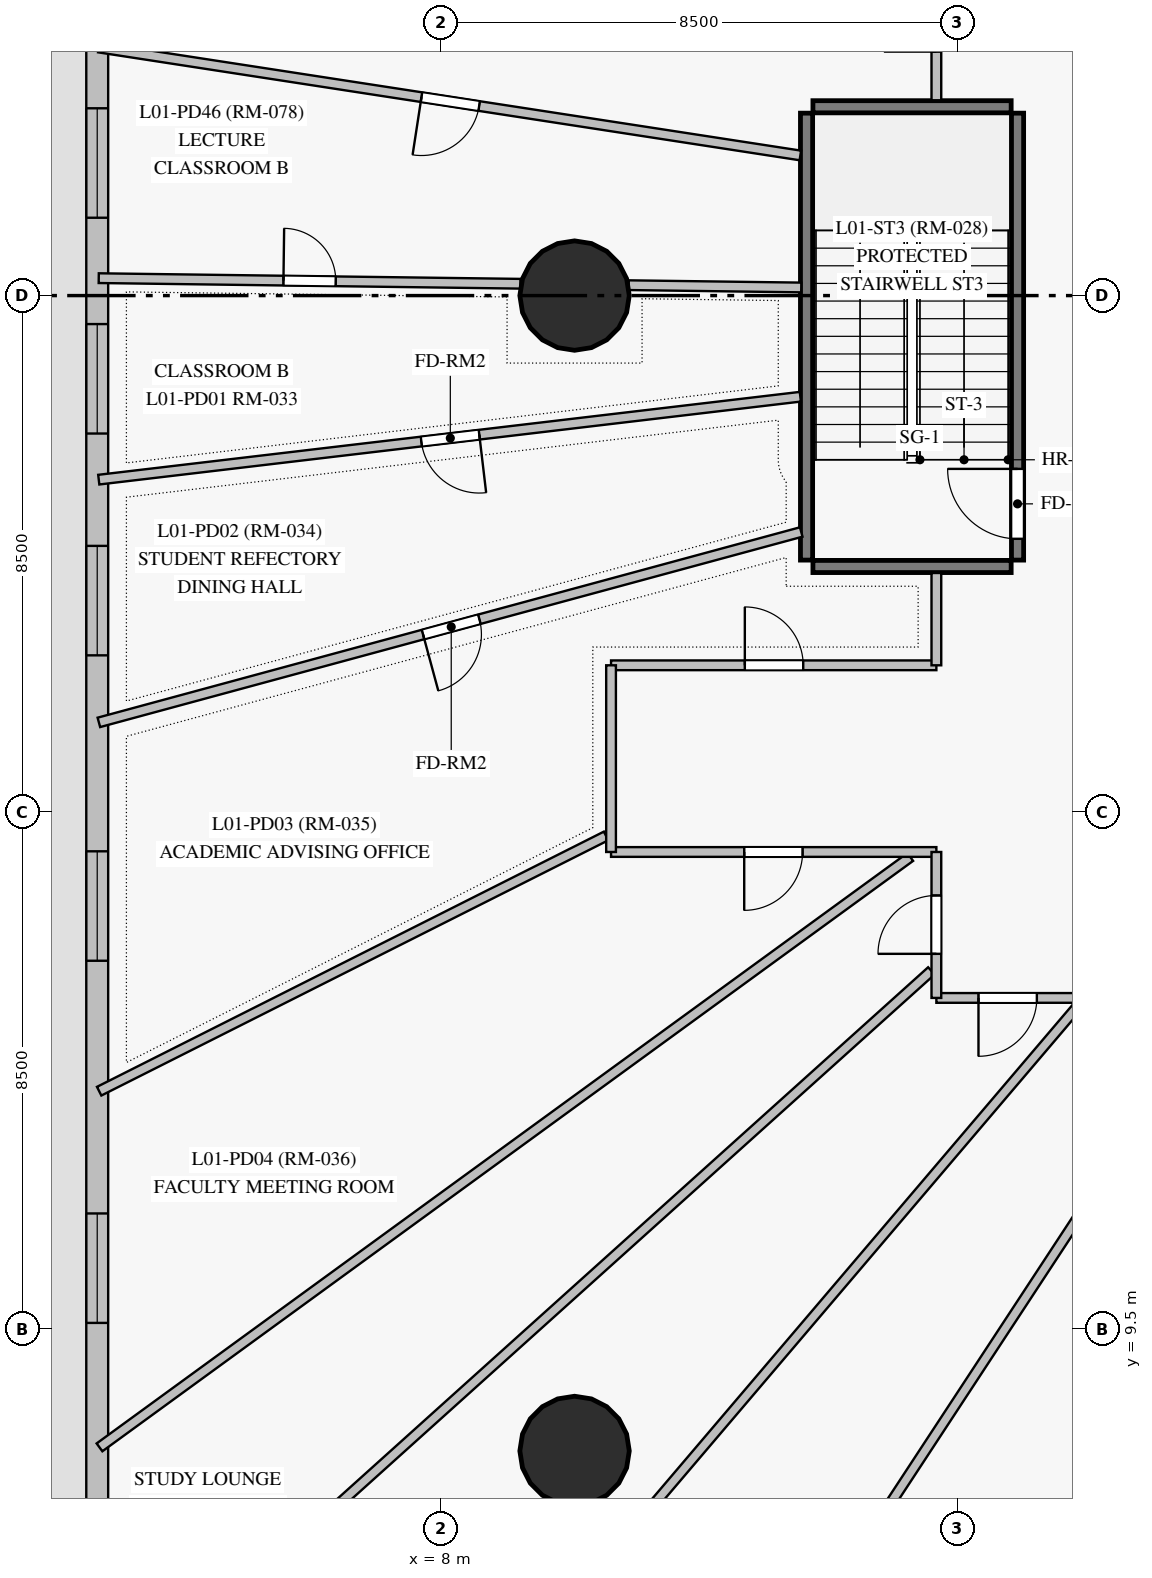
"""IFC4 building model, lengths in metres.
Left out: names, types, materials, properties, quantities, classifications, styles, units other than length and angle.
Written with IfcOpenShell. Run it as: python <this file> out.ifc"""

import sys

from ifc_helpers import new_model, si_unit, direction, frame, frame_2d, origin, origin_with_axes, origin_2d, place, context, subcontext, project, spatial, rectangle, circle, extrude, source, transform, mapped, element, fill, save


model = new_model("IFC4")
c1 = context("Model", 3, precision=1e-05, world=origin(), true_north=direction((0.0, 1.0)))
c2 = subcontext(c1, "Body", "Model", "MODEL_VIEW")
j1 = project(units=[si_unit("LENGTHUNIT", "METRE"), si_unit("PLANEANGLEUNIT", "RADIAN")], contexts=[c1])
p1 = place(None, origin())
s1 = spatial("IfcSite", under=j1, at=p1, CompositionType="ELEMENT")
p2 = place(p1, origin())
s2 = spatial("IfcBuilding", under=s1, at=p2, CompositionType="ELEMENT")
p3 = place(p2, frame((0.0, 0.0, 4.5)))
s3 = spatial("IfcBuildingStorey", under=s2, at=p3, CompositionType="ELEMENT", Elevation=4.5)
m1 = source(origin_with_axes(), c2, "Body", "SweptSolid", [
    extrude(circle(Radius=0.9, at=origin_2d()), origin(), (0.0, 0.0, 1.0), 4.5),
])
for number, where, z_axis, x_axis in (
    (1, (10.2, 7.5, 0.0), (0.0, 0.0, 1.0), (1.0, 0.0, 0.0)),
    (2, (10.2, 26.5, 0.0), (0.0, 0.0, 1.0), (1.0, 0.0, 0.0)),
):
    element("IfcColumn", number, at=place(p3, frame(where, z_axis=z_axis, x_axis=x_axis)), inside=s3, PredefinedType="COLUMN", context=c2, shape_type="MappedRepresentation", body=[
        mapped(m1, transform((0.0, 0.0, 0.0), scale=1.0)),
    ])
p4 = place(p3, frame((2.35, 49.4, 0.0), z_axis=(0.0, 0.0, 1.0), x_axis=(0.0, -1.0, 0.0)))
e3 = element("IfcWall", 3, at=p4, inside=s3, PredefinedType="SOLIDWALL", context=c2, shape_type="SweptSolid", body=[
    extrude(rectangle(XDim=45.8, YDim=0.36, at=frame_2d((22.9, 0.0))), origin(), (0.0, 0.0, 1.0), 4.2),
])
p5 = place(p4, frame((1.655, 0.0, 0.85)))
e4 = element("IfcOpeningElement", 4, at=p5, cuts=e3, PredefinedType="OPENING", context=c2, shape_type="SweptSolid", body=[
    extrude(rectangle(XDim=1.8, YDim=2.2, at=frame_2d((0.9, 1.1))), frame((0.0, 0.19, 0.0), z_axis=(0.0, -1.0, 0.0), x_axis=(1.0, 0.0, 0.0)), (0.0, 0.0, 1.0), 0.38),
])
p6 = place(p4, frame((5.489, 0.0, 0.85)))
e5 = element("IfcOpeningElement", 5, at=p6, cuts=e3, PredefinedType="OPENING", context=c2, shape_type="SweptSolid", body=[
    extrude(rectangle(XDim=1.8, YDim=2.2, at=frame_2d((0.9, 1.1))), frame((0.0, 0.19, 0.0), z_axis=(0.0, -1.0, 0.0), x_axis=(1.0, 0.0, 0.0)), (0.0, 0.0, 1.0), 0.38),
])
p7 = place(p4, frame((19.82, 0.0, 0.85)))
e6 = element("IfcOpeningElement", 6, at=p7, cuts=e3, PredefinedType="OPENING", context=c2, shape_type="SweptSolid", body=[
    extrude(rectangle(XDim=1.8, YDim=2.2, at=frame_2d((0.9, 1.1))), frame((0.0, 0.19, 0.0), z_axis=(0.0, -1.0, 0.0), x_axis=(1.0, 0.0, 0.0)), (0.0, 0.0, 1.0), 0.38),
])
p8 = place(p4, frame((23.368, 0.0, 0.85)))
e7 = element("IfcOpeningElement", 7, at=p8, cuts=e3, PredefinedType="OPENING", context=c2, shape_type="SweptSolid", body=[
    extrude(rectangle(XDim=1.8, YDim=2.2, at=frame_2d((0.9, 1.1))), frame((0.0, 0.19, 0.0), z_axis=(0.0, -1.0, 0.0), x_axis=(1.0, 0.0, 0.0)), (0.0, 0.0, 1.0), 0.38),
])
p9 = place(p4, frame((27.016, 0.0, 0.85)))
e8 = element("IfcOpeningElement", 8, at=p9, cuts=e3, PredefinedType="OPENING", context=c2, shape_type="SweptSolid", body=[
    extrude(rectangle(XDim=1.8, YDim=2.2, at=frame_2d((0.9, 1.1))), frame((0.0, 0.19, 0.0), z_axis=(0.0, -1.0, 0.0), x_axis=(1.0, 0.0, 0.0)), (0.0, 0.0, 1.0), 0.38),
])
p10 = place(p4, frame((32.039, 0.0, 0.85)))
e9 = element("IfcOpeningElement", 9, at=p10, cuts=e3, PredefinedType="OPENING", context=c2, shape_type="SweptSolid", body=[
    extrude(rectangle(XDim=1.8, YDim=2.2, at=frame_2d((0.9, 1.1))), frame((0.0, 0.19, 0.0), z_axis=(0.0, -1.0, 0.0), x_axis=(1.0, 0.0, 0.0)), (0.0, 0.0, 1.0), 0.38),
])
p11 = place(p4, frame((37.994, 0.0, 0.85)))
e10 = element("IfcOpeningElement", 10, at=p11, cuts=e3, PredefinedType="OPENING", context=c2, shape_type="SweptSolid", body=[
    extrude(rectangle(XDim=1.8, YDim=2.2, at=frame_2d((0.9, 1.1))), frame((0.0, 0.19, 0.0), z_axis=(0.0, -1.0, 0.0), x_axis=(1.0, 0.0, 0.0)), (0.0, 0.0, 1.0), 0.38),
])
p12 = place(p4, frame((42.795, 0.0, 0.85)))
e11 = element("IfcOpeningElement", 11, at=p12, cuts=e3, PredefinedType="OPENING", context=c2, shape_type="SweptSolid", body=[
    extrude(rectangle(XDim=1.8, YDim=2.2, at=frame_2d((0.9, 1.1))), frame((0.0, 0.19, 0.0), z_axis=(0.0, -1.0, 0.0), x_axis=(1.0, 0.0, 0.0)), (0.0, 0.0, 1.0), 0.38),
])
p13 = place(p4, frame((14.742, 0.0, 0.0)))
e12 = element("IfcOpeningElement", 12, at=p13, cuts=e3, PredefinedType="OPENING", context=c2, shape_type="SweptSolid", body=[
    extrude(rectangle(XDim=1.05, YDim=2.12, at=frame_2d((0.525, 1.06))), frame((0.0, 0.19, 0.0), z_axis=(0.0, -1.0, 0.0), x_axis=(1.0, 0.0, 0.0)), (0.0, 0.0, 1.0), 0.38),
])
p14 = place(p3, frame((14.015, 22.15, 0.0), z_axis=(0.0, 0.0, 1.0), x_axis=(0.0, 1.0, 0.0)))
e13 = element("IfcWall", 13, at=p14, inside=s3, PredefinedType="SHEAR", context=c2, shape_type="SweptSolid", body=[
    extrude(rectangle(XDim=7.35, YDim=0.2, at=frame_2d((3.675, 0.0))), origin(), (0.0, 0.0, 1.0), 4.2),
])
p15 = place(p3, frame((17.485, 22.15, 0.0), z_axis=(0.0, 0.0, 1.0), x_axis=(0.0, 1.0, 0.0)))
e14 = element("IfcWall", 14, at=p15, inside=s3, PredefinedType="SHEAR", context=c2, shape_type="SweptSolid", body=[
    extrude(rectangle(XDim=7.35, YDim=0.2, at=frame_2d((3.675, 0.0))), origin(), (0.0, 0.0, 1.0), 4.2),
])
p16 = place(p15, frame((0.35, 0.0, 0.0)))
e15 = element("IfcOpeningElement", 15, at=p16, cuts=e14, PredefinedType="OPENING", context=c2, shape_type="SweptSolid", body=[
    extrude(rectangle(XDim=1.15, YDim=2.15, at=frame_2d((0.575, 1.075))), frame((0.0, 0.11, 0.0), z_axis=(0.0, -1.0, 0.0), x_axis=(1.0, 0.0, 0.0)), (0.0, 0.0, 1.0), 0.22),
])
for number, where, z_axis, x_axis in (
    (16, (14.12, 22.045, 0.0), (0.0, 0.0, 1.0), (1.0, 0.0, 0.0)),
    (17, (14.12, 29.605, 0.0), (0.0, 0.0, 1.0), (1.0, 0.0, 0.0)),
):
    element("IfcWall", number, at=place(p3, frame(where, z_axis=z_axis, x_axis=x_axis)), inside=s3, PredefinedType="SHEAR", context=c2, shape_type="SweptSolid", body=[
        extrude(rectangle(XDim=3.26, YDim=0.2, at=frame_2d((1.63, 0.0))), origin(), (0.0, 0.0, 1.0), 4.2),
    ])
p17 = place(p3, frame((16.068, 15.395, 0.0), z_axis=(0.0, 0.0, 1.0), x_axis=(-0.743380945554, -0.668868275363, 0.0)))
e18 = element("IfcWall", 18, at=p17, inside=s3, PredefinedType="PARTITIONING", context=c2, shape_type="SweptSolid", body=[
    extrude(rectangle(XDim=18.04, YDim=0.16, at=frame_2d((9.02, 0.0))), origin(), (0.0, 0.0, 1.0), 4.2),
])
p18 = place(p3, frame((15.72, 17.268, 0.0), z_axis=(0.0, 0.0, 1.0), x_axis=(-0.808377474391, -0.588664470557, 0.0)))
e19 = element("IfcWall", 19, at=p18, inside=s3, PredefinedType="PARTITIONING", context=c2, shape_type="SweptSolid", body=[
    extrude(rectangle(XDim=16.493, YDim=0.16, at=frame_2d((8.247, 0.0))), origin(), (0.0, 0.0, 1.0), 4.2),
])
p19 = place(p3, frame((18.521, 14.868, 0.0), z_axis=(0.0, 0.0, 1.0), x_axis=(-0.648138169465, -0.76152275953, 0.0)))
e20 = element("IfcWall", 20, at=p19, inside=s3, PredefinedType="PARTITIONING", context=c2, shape_type="SweptSolid", body=[
    extrude(rectangle(XDim=16.188, YDim=0.16, at=frame_2d((8.094, 0.0))), origin(), (0.0, 0.0, 1.0), 4.2),
])
p20 = place(p3, frame((20.796, 14.868, 0.0), z_axis=(0.0, 0.0, 1.0), x_axis=(-0.548619925722, -0.836071873167, 0.0)))
e21 = element("IfcWall", 21, at=p20, inside=s3, PredefinedType="PARTITIONING", context=c2, shape_type="SweptSolid", body=[
    extrude(rectangle(XDim=14.75, YDim=0.16, at=frame_2d((7.375, 0.0))), origin(), (0.0, 0.0, 1.0), 4.2),
])
p21 = place(p3, frame((13.927, 22.612, 0.0), z_axis=(0.0, 0.0, 1.0), x_axis=(-0.965170368773, -0.261622168868, 0.0)))
e22 = element("IfcWall", 22, at=p21, inside=s3, PredefinedType="PARTITIONING", context=c2, shape_type="SweptSolid", body=[
    extrude(rectangle(XDim=11.967, YDim=0.16, at=frame_2d((5.983, 0.0))), origin(), (0.0, 0.0, 1.0), 4.2),
])
p22 = place(p21, frame((5.483, 0.0, 0.0)))
e23 = element("IfcOpeningElement", 23, at=p22, cuts=e22, PredefinedType="OPENING", context=c2, shape_type="SweptSolid", body=[
    extrude(rectangle(XDim=0.96, YDim=2.15, at=frame_2d((0.48, 1.075))), frame((0.0, 0.09, 0.0), z_axis=(0.0, -1.0, 0.0), x_axis=(1.0, 0.0, 0.0)), (0.0, 0.0, 1.0), 0.18),
])
p23 = place(p3, frame((13.913, 28.805, 0.0), z_axis=(0.0, 0.0, 1.0), x_axis=(-0.988375807734, 0.15203046631, 0.0)))
e24 = element("IfcWall", 24, at=p23, inside=s3, PredefinedType="PARTITIONING", context=c2, shape_type="SweptSolid", body=[
    extrude(rectangle(XDim=11.673, YDim=0.16, at=frame_2d((5.836, 0.0))), origin(), (0.0, 0.0, 1.0), 4.2),
])
p24 = place(p23, frame((5.344, 0.0, 0.0)))
e25 = element("IfcOpeningElement", 25, at=p24, cuts=e24, PredefinedType="OPENING", context=c2, shape_type="SweptSolid", body=[
    extrude(rectangle(XDim=0.96, YDim=2.15, at=frame_2d((0.48, 1.075))), frame((0.0, 0.09, 0.0), z_axis=(0.0, -1.0, 0.0), x_axis=(1.0, 0.0, 0.0)), (0.0, 0.0, 1.0), 0.18),
])
p25 = place(p3, frame((13.913, 24.836, 0.0), z_axis=(0.0, 0.0, 1.0), x_axis=(-0.993088930129, -0.117364291226, 0.0)))
e26 = element("IfcWall", 26, at=p25, inside=s3, PredefinedType="PARTITIONING", context=c2, shape_type="SweptSolid", body=[
    extrude(rectangle(XDim=11.618, YDim=0.16, at=frame_2d((5.809, 0.0))), origin(), (0.0, 0.0, 1.0), 4.2),
])
p26 = place(p25, frame((5.316, 0.0, 0.0)))
e27 = element("IfcOpeningElement", 27, at=p26, cuts=e26, PredefinedType="OPENING", context=c2, shape_type="SweptSolid", body=[
    extrude(rectangle(XDim=0.96, YDim=2.15, at=frame_2d((0.48, 1.075))), frame((0.0, 0.09, 0.0), z_axis=(0.0, -1.0, 0.0), x_axis=(1.0, 0.0, 0.0)), (0.0, 0.0, 1.0), 0.18),
])
p27 = place(p3, frame((10.718, 17.614, 0.0), z_axis=(0.0, 0.0, 1.0), x_axis=(-0.893173330912, -0.449712575927, 0.0)))
e28 = element("IfcWall", 28, at=p27, inside=s3, PredefinedType="PARTITIONING", context=c2, shape_type="SweptSolid", body=[
    extrude(rectangle(XDim=9.333, YDim=0.16, at=frame_2d((4.667, 0.0))), origin(), (0.0, 0.0, 1.0), 4.2),
])
p28 = place(p3, frame((2.375, 26.787, 0.0), z_axis=(0.0, 0.0, 1.0), x_axis=(0.999911940712, -0.013270675267, 0.0)))
e29 = element("IfcWall", 29, at=p28, inside=s3, PredefinedType="PARTITIONING", context=c2, shape_type="SweptSolid", body=[
    extrude(rectangle(XDim=6.936, YDim=0.16, at=frame_2d((3.468, 0.0))), origin(), (0.0, 0.0, 1.0), 4.2),
])
p29 = place(p28, frame((3.038, 0.0, 0.0)))
e30 = element("IfcOpeningElement", 30, at=p29, cuts=e29, PredefinedType="OPENING", context=c2, shape_type="SweptSolid", body=[
    extrude(rectangle(XDim=0.86, YDim=2.04, at=frame_2d((0.43, 1.02))), frame((0.0, 0.09, 0.0), z_axis=(0.0, -1.0, 0.0), x_axis=(1.0, 0.0, 0.0)), (0.0, 0.0, 1.0), 0.18),
])
p30 = place(p3, frame((16.15, 29.712, 0.0), z_axis=(0.0, 0.0, 1.0), x_axis=(0.0, 1.0, 0.0)))
e31 = element("IfcWall", 31, at=p30, inside=s3, PredefinedType="PARTITIONING", context=c2, shape_type="SweptSolid", body=[
    extrude(rectangle(XDim=5.861, YDim=0.16, at=frame_2d((2.93, 0.0))), origin(), (0.0, 0.0, 1.0), 4.2),
])
p31 = place(p30, frame((4.462, 0.0, 0.0)))
e32 = element("IfcOpeningElement", 32, at=p31, cuts=e31, PredefinedType="OPENING", context=c2, shape_type="SweptSolid", body=[
    extrude(rectangle(XDim=0.96, YDim=2.15, at=frame_2d((0.48, 1.075))), frame((0.0, 0.09, 0.0), z_axis=(0.0, -1.0, 0.0), x_axis=(1.0, 0.0, 0.0)), (0.0, 0.0, 1.0), 0.18),
])
p32 = place(p30, frame((0.8, 0.0, 0.0)))
e33 = element("IfcOpeningElement", 33, at=p32, cuts=e31, PredefinedType="OPENING", context=c2, shape_type="SweptSolid", body=[
    extrude(rectangle(XDim=0.86, YDim=2.1, at=frame_2d((0.43, 1.05))), frame((0.0, 0.09, 0.0), z_axis=(0.0, -1.0, 0.0), x_axis=(1.0, 0.0, 0.0)), (0.0, 0.0, 1.0), 0.18),
])
p33 = place(p3, frame((16.15, 17.35, 0.0), z_axis=(0.0, 0.0, 1.0), x_axis=(-1.0, 0.0, 0.0)))
e34 = element("IfcWall", 34, at=p33, inside=s3, PredefinedType="PARTITIONING", context=c2, shape_type="SweptSolid", body=[
    extrude(rectangle(XDim=5.35, YDim=0.16, at=frame_2d((2.675, 0.0))), origin(), (0.0, 0.0, 1.0), 4.2),
])
p34 = place(p33, frame((2.2, 0.0, 0.0)))
e35 = element("IfcOpeningElement", 35, at=p34, cuts=e34, PredefinedType="OPENING", context=c2, shape_type="SweptSolid", body=[
    extrude(rectangle(XDim=0.96, YDim=2.15, at=frame_2d((0.48, 1.075))), frame((0.0, 0.09, 0.0), z_axis=(0.0, -1.0, 0.0), x_axis=(1.0, 0.0, 0.0)), (0.0, 0.0, 1.0), 0.18),
])
p35 = place(p3, frame((10.8, 20.42, 0.0), z_axis=(0.0, 0.0, 1.0), x_axis=(1.0, 0.0, 0.0)))
e36 = element("IfcWall", 36, at=p35, inside=s3, PredefinedType="PARTITIONING", context=c2, shape_type="SweptSolid", body=[
    extrude(rectangle(XDim=5.35, YDim=0.16, at=frame_2d((2.675, 0.0))), origin(), (0.0, 0.0, 1.0), 3.25),
])
p36 = place(p35, frame((2.2, 0.0, 0.0)))
e37 = element("IfcOpeningElement", 37, at=p36, cuts=e36, PredefinedType="OPENING", context=c2, shape_type="SweptSolid", body=[
    extrude(rectangle(XDim=0.96, YDim=2.15, at=frame_2d((0.48, 1.075))), frame((0.0, 0.09, 0.0), z_axis=(0.0, -1.0, 0.0), x_axis=(1.0, 0.0, 0.0)), (0.0, 0.0, 1.0), 0.18),
])
p37 = place(p3, frame((21.2, 14.95, 0.0), z_axis=(0.0, 0.0, 1.0), x_axis=(-1.0, 0.0, 0.0)))
e38 = element("IfcWall", 38, at=p37, inside=s3, PredefinedType="PARTITIONING", context=c2, shape_type="SweptSolid", body=[
    extrude(rectangle(XDim=5.05, YDim=0.16, at=frame_2d((2.525, 0.0))), origin(), (0.0, 0.0, 1.0), 4.2),
])
p38 = place(p37, frame((3.397, 0.0, 0.0)))
e39 = element("IfcOpeningElement", 39, at=p38, cuts=e38, PredefinedType="OPENING", context=c2, shape_type="SweptSolid", body=[
    extrude(rectangle(XDim=0.96, YDim=2.15, at=frame_2d((0.48, 1.075))), frame((0.0, 0.09, 0.0), z_axis=(0.0, -1.0, 0.0), x_axis=(1.0, 0.0, 0.0)), (0.0, 0.0, 1.0), 0.18),
])
p39 = place(p37, frame((1.51, 0.0, 0.0)))
e40 = element("IfcOpeningElement", 40, at=p39, cuts=e38, PredefinedType="OPENING", context=c2, shape_type="SweptSolid", body=[
    extrude(rectangle(XDim=0.96, YDim=2.15, at=frame_2d((0.48, 1.075))), frame((0.0, 0.09, 0.0), z_axis=(0.0, -1.0, 0.0), x_axis=(1.0, 0.0, 0.0)), (0.0, 0.0, 1.0), 0.18),
])
p40 = place(p3, frame((10.8, 17.35, 0.0), z_axis=(0.0, 0.0, 1.0), x_axis=(0.0, 1.0, 0.0)))
e41 = element("IfcWall", 41, at=p40, inside=s3, PredefinedType="PARTITIONING", context=c2, shape_type="SweptSolid", body=[
    extrude(rectangle(XDim=3.07, YDim=0.16, at=frame_2d((1.535, 0.0))), origin(), (0.0, 0.0, 1.0), 3.25),
])
p41 = place(p3, frame((11.09, 26.671, 0.0), z_axis=(0.0, 0.0, 1.0), x_axis=(0.999912250818, -0.013247288939, 0.0)))
e42 = element("IfcWall", 42, at=p41, inside=s3, PredefinedType="PARTITIONING", context=c2, shape_type="SweptSolid", body=[
    extrude(rectangle(XDim=2.838, YDim=0.16, at=frame_2d((1.419, 0.0))), origin(), (0.0, 0.0, 1.0), 3.25),
])
p42 = place(p3, frame((16.15, 14.95, 0.0), z_axis=(0.0, 0.0, 1.0), x_axis=(0.0, 1.0, 0.0)))
e43 = element("IfcWall", 43, at=p42, inside=s3, PredefinedType="PARTITIONING", context=c2, shape_type="SweptSolid", body=[
    extrude(rectangle(XDim=2.4, YDim=0.16, at=frame_2d((1.2, 0.0))), origin(), (0.0, 0.0, 1.0), 3.25),
])
p43 = place(p42, frame((0.725, 0.0, 0.0)))
e44 = element("IfcOpeningElement", 44, at=p43, cuts=e43, PredefinedType="OPENING", context=c2, shape_type="SweptSolid", body=[
    extrude(rectangle(XDim=0.96, YDim=2.15, at=frame_2d((0.48, 1.075))), frame((0.0, 0.09, 0.0), z_axis=(0.0, -1.0, 0.0), x_axis=(1.0, 0.0, 0.0)), (0.0, 0.0, 1.0), 0.18),
])
p44 = place(p3, frame((16.15, 20.42, 0.0), z_axis=(0.0, 0.0, 1.0), x_axis=(0.0, 1.0, 0.0)))
e45 = element("IfcWall", 45, at=p44, inside=s3, PredefinedType="PARTITIONING", context=c2, shape_type="SweptSolid", body=[
    extrude(rectangle(XDim=1.518, YDim=0.16, at=frame_2d((0.759, 0.0))), origin(), (0.0, 0.0, 1.0), 4.2),
])
m2 = source(origin_with_axes(), c2, "Body", "SweptSolid", [
    extrude(rectangle(XDim=1.8, YDim=2.2, at=frame_2d((0.9, 1.1))), frame((0.0, 0.03, 0.0), z_axis=(0.0, -1.0, 0.0), x_axis=(1.0, 0.0, 0.0)), (0.0, 0.0, 1.0), 0.06),
])
p45 = place(p7, origin())
e46 = element("IfcWindow", 46, at=p45, inside=s3, PartitioningType="SINGLE_PANEL", PredefinedType="WINDOW", context=c2, shape_type="MappedRepresentation", body=[
    mapped(m2, transform((0.0, 0.0, 0.0), scale=1.0)),
])
fill(e6, e46)
p46 = place(p8, origin())
e47 = element("IfcWindow", 47, at=p46, inside=s3, PartitioningType="SINGLE_PANEL", PredefinedType="WINDOW", context=c2, shape_type="MappedRepresentation", body=[
    mapped(m2, transform((0.0, 0.0, 0.0), scale=1.0)),
])
fill(e7, e47)
p47 = place(p9, origin())
e48 = element("IfcWindow", 48, at=p47, inside=s3, PartitioningType="SINGLE_PANEL", PredefinedType="WINDOW", context=c2, shape_type="MappedRepresentation", body=[
    mapped(m2, transform((0.0, 0.0, 0.0), scale=1.0)),
])
fill(e8, e48)
p48 = place(p10, origin())
e49 = element("IfcWindow", 49, at=p48, inside=s3, PartitioningType="SINGLE_PANEL", PredefinedType="WINDOW", context=c2, shape_type="MappedRepresentation", body=[
    mapped(m2, transform((0.0, 0.0, 0.0), scale=1.0)),
])
fill(e9, e49)
p49 = place(p11, origin())
e50 = element("IfcWindow", 50, at=p49, inside=s3, PartitioningType="SINGLE_PANEL", PredefinedType="WINDOW", context=c2, shape_type="MappedRepresentation", body=[
    mapped(m2, transform((0.0, 0.0, 0.0), scale=1.0)),
])
fill(e10, e50)
m3 = source(origin_with_axes(), c2, "Body", "SweptSolid", [
    extrude(rectangle(XDim=1.15, YDim=2.15, at=frame_2d((0.575, 1.075))), frame((0.0, 0.025, 0.0), z_axis=(0.0, -1.0, 0.0), x_axis=(1.0, 0.0, 0.0)), (0.0, 0.0, 1.0), 0.05),
])
p50 = place(p16, origin())
e51 = element("IfcDoor", 51, at=p50, inside=s3, OperationType="SINGLE_SWING_RIGHT", PredefinedType="DOOR", context=c2, shape_type="MappedRepresentation", body=[
    mapped(m3, transform((0.0, 0.0, 0.0), scale=1.0)),
])
fill(e15, e51)
m4 = source(origin_with_axes(), c2, "Body", "SweptSolid", [
    extrude(rectangle(XDim=0.96, YDim=2.15, at=frame_2d((0.48, 1.075))), frame((0.0, 0.025, 0.0), z_axis=(0.0, -1.0, 0.0), x_axis=(1.0, 0.0, 0.0)), (0.0, 0.0, 1.0), 0.05),
])
p51 = place(p26, origin())
e52 = element("IfcDoor", 52, at=p51, inside=s3, OperationType="SINGLE_SWING_LEFT", PredefinedType="DOOR", context=c2, shape_type="MappedRepresentation", body=[
    mapped(m4, transform((0.0, 0.0, 0.0), scale=1.0)),
])
fill(e27, e52)
p52 = place(p22, origin())
e53 = element("IfcDoor", 53, at=p52, inside=s3, OperationType="SINGLE_SWING_RIGHT", PredefinedType="DOOR", context=c2, shape_type="MappedRepresentation", body=[
    mapped(m4, transform((0.0, 0.0, 0.0), scale=1.0)),
])
fill(e23, e53)
p53 = place(p36, origin())
e54 = element("IfcDoor", 54, at=p53, inside=s3, OperationType="SINGLE_SWING_LEFT", PredefinedType="DOOR", context=c2, shape_type="MappedRepresentation", body=[
    mapped(m4, transform((0.0, 0.0, 0.0), scale=1.0)),
])
fill(e37, e54)
p54 = place(p34, origin())
e55 = element("IfcDoor", 55, at=p54, inside=s3, OperationType="SINGLE_SWING_RIGHT", PredefinedType="DOOR", context=c2, shape_type="MappedRepresentation", body=[
    mapped(m4, transform((0.0, 0.0, 0.0), scale=1.0)),
])
fill(e35, e55)
p55 = place(p43, origin())
e56 = element("IfcDoor", 56, at=p55, inside=s3, OperationType="SINGLE_SWING_LEFT", PredefinedType="DOOR", context=c2, shape_type="MappedRepresentation", body=[
    mapped(m4, transform((0.0, 0.0, 0.0), scale=1.0)),
])
fill(e44, e56)
p56 = place(p38, origin())
e57 = element("IfcDoor", 57, at=p56, inside=s3, OperationType="SINGLE_SWING_RIGHT", PredefinedType="DOOR", context=c2, shape_type="MappedRepresentation", body=[
    mapped(m4, transform((0.0, 0.0, 0.0), scale=1.0)),
])
fill(e39, e57)
p57 = place(p24, origin())
e58 = element("IfcDoor", 58, at=p57, inside=s3, OperationType="SINGLE_SWING_RIGHT", PredefinedType="DOOR", context=c2, shape_type="MappedRepresentation", body=[
    mapped(m4, transform((0.0, 0.0, 0.0), scale=1.0)),
])
fill(e25, e58)
m5 = source(origin_with_axes(), c2, "Body", "SweptSolid", [
    extrude(rectangle(XDim=0.86, YDim=2.04, at=frame_2d((0.43, 1.02))), frame((0.0, 0.025, 0.0), z_axis=(0.0, -1.0, 0.0), x_axis=(1.0, 0.0, 0.0)), (0.0, 0.0, 1.0), 0.05),
])
p58 = place(p29, origin())
e59 = element("IfcDoor", 59, at=p58, inside=s3, OperationType="SINGLE_SWING_LEFT", PredefinedType="DOOR", context=c2, shape_type="MappedRepresentation", body=[
    mapped(m5, transform((0.0, 0.0, 0.0), scale=1.0)),
])
fill(e30, e59)
save(model, sys.argv[1])
